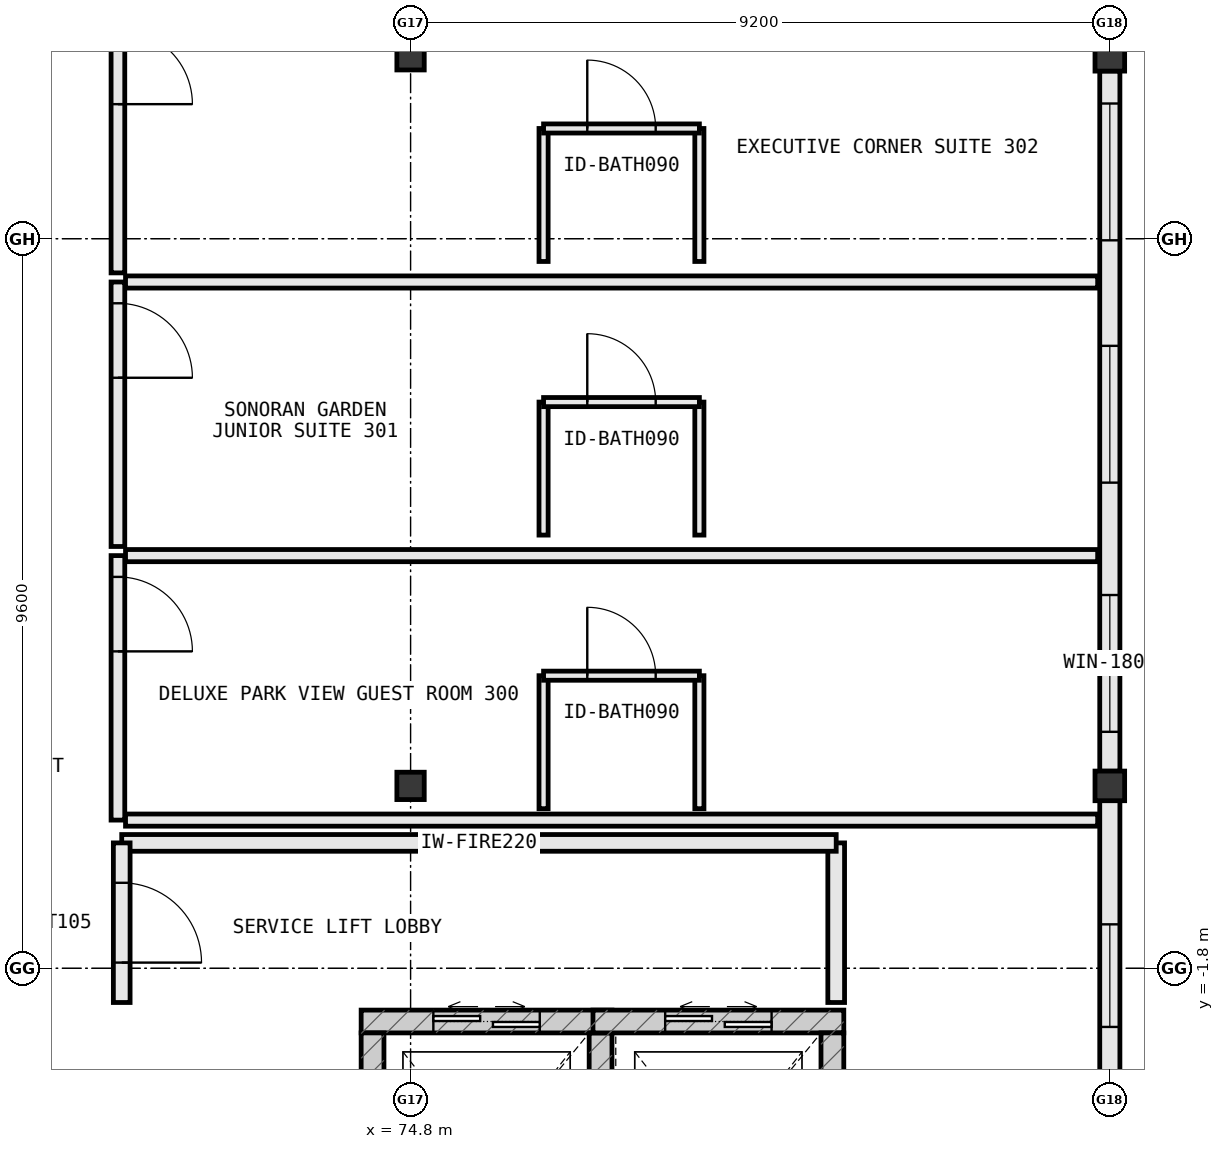
"""IFC4 building model, lengths in metres.
Left out: names, types, materials, properties, quantities, classifications, styles, units other than length and angle.
Written with IfcOpenShell. Run it as: python <this file> out.ifc"""

import sys

from ifc_helpers import new_model, si_unit, direction, frame, frame_2d, origin, origin_2d, place, context, subcontext, project, spatial, rectangle, extrude, element, fill, save


model = new_model("IFC4")
c1 = context("Model", 3, precision=1e-05, world=origin(), true_north=direction((0.0, 1.0)))
c2 = subcontext(c1, "Body", "Model", "MODEL_VIEW")
j1 = project(units=[si_unit("LENGTHUNIT", "METRE"), si_unit("PLANEANGLEUNIT", "RADIAN")], contexts=[c1])
p1 = place(None, origin())
s1 = spatial("IfcSite", under=j1, at=p1, CompositionType="ELEMENT")
p2 = place(p1, origin())
s2 = spatial("IfcBuilding", under=s1, at=p2, CompositionType="ELEMENT")
p3 = place(p2, frame((0.0, 0.0, 46.6)))
s3 = spatial("IfcBuildingStorey", under=s2, at=p3, CompositionType="ELEMENT", Elevation=46.6)
for number, where, z_axis, x_axis in (
    (1, (74.8, 0.6, 0.0), (0.0, 0.0, 1.0), (1.0, 0.0, 0.0)),
    (2, (74.8, 10.2, 0.0), (0.0, 0.0, 1.0), (1.0, 0.0, 0.0)),
):
    element("IfcColumn", number, at=place(p3, frame(where, z_axis=z_axis, x_axis=x_axis)), inside=s3, PredefinedType="COLUMN", context=c2, shape_type="SweptSolid", body=[
        extrude(rectangle(XDim=0.36, YDim=0.36, at=origin_2d()), origin(), (0.0, 0.0, 1.0), 4.2),
    ])
for number, where, z_axis, x_axis in (
    (3, (84.0, 0.6, 0.0), (0.0, 0.0, 1.0), (1.0, 0.0, 0.0)),
    (4, (84.0, 10.2, 0.0), (0.0, 0.0, 1.0), (1.0, 0.0, 0.0)),
):
    element("IfcColumn", number, at=place(p3, frame(where, z_axis=z_axis, x_axis=x_axis)), inside=s3, PredefinedType="COLUMN", context=c2, shape_type="SweptSolid", body=[
        extrude(rectangle(XDim=0.39, YDim=0.39, at=origin_2d()), origin(), (0.0, 0.0, 1.0), 4.2),
    ])
p4 = place(p3, frame((84.0, -8.807, 0.0), z_axis=(0.0, 0.0, 1.0), x_axis=(0.0, 1.0, 0.0)))
e5 = element("IfcWall", 5, at=p4, inside=s3, PredefinedType="STANDARD", context=c2, shape_type="SweptSolid", body=[
    extrude(rectangle(XDim=9.214, YDim=0.265, at=frame_2d((4.607, 0.0))), origin(), (0.0, 0.0, 1.0), 3.99),
])
p5 = place(p4, frame((1.628, 0.0, 0.85)))
e6 = element("IfcOpeningElement", 6, at=p5, cuts=e5, PredefinedType="OPENING", context=c2, shape_type="SweptSolid", body=[
    extrude(rectangle(XDim=1.35, YDim=1.65, at=frame_2d((0.675, 0.825))), frame((0.0, 0.145, 0.0), z_axis=(0.0, -1.0, 0.0), x_axis=(1.0, 0.0, 0.0)), (0.0, 0.0, 1.0), 0.289),
])
p6 = place(p4, frame((6.236, 0.0, 0.85)))
e7 = element("IfcOpeningElement", 7, at=p6, cuts=e5, PredefinedType="OPENING", context=c2, shape_type="SweptSolid", body=[
    extrude(rectangle(XDim=1.35, YDim=1.65, at=frame_2d((0.675, 0.825))), frame((0.0, 0.145, 0.0), z_axis=(0.0, -1.0, 0.0), x_axis=(1.0, 0.0, 0.0)), (0.0, 0.0, 1.0), 0.289),
])
p7 = place(p3, frame((84.0, 0.793, 0.0), z_axis=(0.0, 0.0, 1.0), x_axis=(0.0, 1.0, 0.0)))
e8 = element("IfcWall", 8, at=p7, inside=s3, PredefinedType="STANDARD", context=c2, shape_type="SweptSolid", body=[
    extrude(rectangle(XDim=9.214, YDim=0.265, at=frame_2d((4.607, 0.0))), origin(), (0.0, 0.0, 1.0), 3.99),
])
p8 = place(p7, frame((0.519, 0.0, 0.85)))
e9 = element("IfcOpeningElement", 9, at=p8, cuts=e8, PredefinedType="OPENING", context=c2, shape_type="SweptSolid", body=[
    extrude(rectangle(XDim=1.8, YDim=1.85, at=frame_2d((0.9, 0.925))), frame((0.0, 0.145, 0.0), z_axis=(0.0, -1.0, 0.0), x_axis=(1.0, 0.0, 0.0)), (0.0, 0.0, 1.0), 0.289),
])
p9 = place(p7, frame((3.797, 0.0, 0.85)))
e10 = element("IfcOpeningElement", 10, at=p9, cuts=e8, PredefinedType="OPENING", context=c2, shape_type="SweptSolid", body=[
    extrude(rectangle(XDim=1.8, YDim=1.85, at=frame_2d((0.9, 0.925))), frame((0.0, 0.145, 0.0), z_axis=(0.0, -1.0, 0.0), x_axis=(1.0, 0.0, 0.0)), (0.0, 0.0, 1.0), 0.289),
])
p10 = place(p7, frame((6.986, 0.0, 0.85)))
e11 = element("IfcOpeningElement", 11, at=p10, cuts=e8, PredefinedType="OPENING", context=c2, shape_type="SweptSolid", body=[
    extrude(rectangle(XDim=1.8, YDim=1.85, at=frame_2d((0.9, 0.925))), frame((0.0, 0.145, 0.0), z_axis=(0.0, -1.0, 0.0), x_axis=(1.0, 0.0, 0.0)), (0.0, 0.0, 1.0), 0.289),
])
p11 = place(p3, frame((77.45, -2.5, 0.0), z_axis=(0.0, 0.0, 1.0), x_axis=(-1.0, 0.0, 0.0)))
e12 = element("IfcWall", 12, at=p11, inside=s3, PredefinedType="SHEAR", context=c2, shape_type="SweptSolid", body=[
    extrude(rectangle(XDim=3.3, YDim=0.3, at=frame_2d((1.65, 0.0))), origin(), (0.0, 0.0, 1.0), 3.99),
])
p12 = place(p11, frame((0.95, 0.0, 0.0)))
e13 = element("IfcOpeningElement", 13, at=p12, cuts=e12, PredefinedType="OPENING", context=c2, shape_type="SweptSolid", body=[
    extrude(rectangle(XDim=1.4, YDim=2.2, at=frame_2d((0.7, 1.1))), frame((0.0, 0.162, 0.0), z_axis=(0.0, -1.0, 0.0), x_axis=(1.0, 0.0, 0.0)), (0.0, 0.0, 1.0), 0.324),
])
for number, where, z_axis, x_axis in (
    (14, (77.3, -5.95, 0.0), (0.0, 0.0, 1.0), (0.0, 1.0, 0.0)),
    (15, (74.3, -2.65, 0.0), (0.0, 0.0, 1.0), (0.0, -1.0, 0.0)),
):
    element("IfcWall", number, at=place(p3, frame(where, z_axis=z_axis, x_axis=x_axis)), inside=s3, PredefinedType="SHEAR", context=c2, shape_type="SweptSolid", body=[
        extrude(rectangle(XDim=3.3, YDim=0.3, at=frame_2d((1.65, 0.0))), origin(), (0.0, 0.0, 1.0), 3.99),
    ])
p13 = place(p3, frame((80.5, -2.5, 0.0), z_axis=(0.0, 0.0, 1.0), x_axis=(-1.0, 0.0, 0.0)))
e16 = element("IfcWall", 16, at=p13, inside=s3, PredefinedType="SHEAR", context=c2, shape_type="SweptSolid", body=[
    extrude(rectangle(XDim=3.3, YDim=0.3, at=frame_2d((1.65, 0.0))), origin(), (0.0, 0.0, 1.0), 3.99),
])
p14 = place(p13, frame((0.95, 0.0, 0.0)))
e17 = element("IfcOpeningElement", 17, at=p14, cuts=e16, PredefinedType="OPENING", context=c2, shape_type="SweptSolid", body=[
    extrude(rectangle(XDim=1.4, YDim=2.2, at=frame_2d((0.7, 1.1))), frame((0.0, 0.162, 0.0), z_axis=(0.0, -1.0, 0.0), x_axis=(1.0, 0.0, 0.0)), (0.0, 0.0, 1.0), 0.324),
])
p15 = place(p3, frame((80.35, -5.95, 0.0), z_axis=(0.0, 0.0, 1.0), x_axis=(0.0, 1.0, 0.0)))
e18 = element("IfcWall", 18, at=p15, inside=s3, PredefinedType="SHEAR", context=c2, shape_type="SweptSolid", body=[
    extrude(rectangle(XDim=3.3, YDim=0.3, at=frame_2d((1.65, 0.0))), origin(), (0.0, 0.0, 1.0), 3.99),
])
p16 = place(p3, frame((80.4, -2.25, 0.0), z_axis=(0.0, 0.0, 1.0), x_axis=(0.0, 1.0, 0.0)))
e19 = element("IfcWall", 19, at=p16, inside=s3, PredefinedType="STANDARD", context=c2, shape_type="SweptSolid", body=[
    extrude(rectangle(XDim=2.1, YDim=0.22, at=frame_2d((1.05, 0.0))), origin(), (0.0, 0.0, 1.0), 3.99),
])
p17 = place(p3, frame((80.4, -0.15, 0.0), z_axis=(0.0, 0.0, 1.0), x_axis=(-1.0, 0.0, 0.0)))
e20 = element("IfcWall", 20, at=p17, inside=s3, PredefinedType="STANDARD", context=c2, shape_type="SweptSolid", body=[
    extrude(rectangle(XDim=9.4, YDim=0.22, at=frame_2d((4.7, 0.0))), origin(), (0.0, 0.0, 1.0), 3.99),
])
p18 = place(p3, frame((71.0, -0.15, 0.0), z_axis=(0.0, 0.0, 1.0), x_axis=(0.0, -1.0, 0.0)))
e21 = element("IfcWall", 21, at=p18, inside=s3, PredefinedType="STANDARD", context=c2, shape_type="SweptSolid", body=[
    extrude(rectangle(XDim=2.1, YDim=0.22, at=frame_2d((1.05, 0.0))), origin(), (0.0, 0.0, 1.0), 3.99),
])
p19 = place(p18, frame((0.525, 0.0, 0.0)))
e22 = element("IfcOpeningElement", 22, at=p19, cuts=e21, PredefinedType="OPENING", context=c2, shape_type="SweptSolid", body=[
    extrude(rectangle(XDim=1.05, YDim=2.2, at=frame_2d((0.525, 1.1))), frame((0.0, 0.122, 0.0), z_axis=(0.0, -1.0, 0.0), x_axis=(1.0, 0.0, 0.0)), (0.0, 0.0, 1.0), 0.244),
])
p20 = place(p3, frame((70.95, 3.63, 0.0), z_axis=(0.0, 0.0, 1.0), x_axis=(0.0, -1.0, 0.0)))
e23 = element("IfcWall", 23, at=p20, inside=s3, PredefinedType="PARTITIONING", context=c2, shape_type="SweptSolid", body=[
    extrude(rectangle(XDim=3.48, YDim=0.18, at=frame_2d((1.74, 0.0))), origin(), (0.0, 0.0, 1.0), 3.99),
])
p21 = place(p20, frame((0.28, 0.0, 0.0)))
e24 = element("IfcOpeningElement", 24, at=p21, cuts=e23, PredefinedType="OPENING", context=c2, shape_type="SweptSolid", body=[
    extrude(rectangle(XDim=0.98, YDim=2.18, at=frame_2d((0.49, 1.09))), frame((0.0, 0.102, 0.0), z_axis=(0.0, -1.0, 0.0), x_axis=(1.0, 0.0, 0.0)), (0.0, 0.0, 1.0), 0.204),
])
for number, where, z_axis, x_axis in (
    (25, (71.05, 0.15, 0.0), (0.0, 0.0, 1.0), (1.0, 0.0, 0.0)),
    (26, (71.05, 3.63, 0.0), (0.0, 0.0, 1.0), (1.0, 0.0, 0.0)),
):
    element("IfcWall", number, at=place(p3, frame(where, z_axis=z_axis, x_axis=x_axis)), inside=s3, PredefinedType="PARTITIONING", context=c2, shape_type="SweptSolid", body=[
        extrude(rectangle(XDim=12.79, YDim=0.16, at=frame_2d((6.395, 0.0))), origin(), (0.0, 0.0, 1.0), 3.99),
    ])
for number, where, z_axis, x_axis in (
    (27, (76.55, 0.3, 0.0), (0.0, 0.0, 1.0), (0.0, 1.0, 0.0)),
    (28, (78.6, 0.3, 0.0), (0.0, 0.0, 1.0), (0.0, 1.0, 0.0)),
):
    element("IfcWall", number, at=place(p3, frame(where, z_axis=z_axis, x_axis=x_axis)), inside=s3, PredefinedType="PARTITIONING", context=c2, shape_type="SweptSolid", body=[
        extrude(rectangle(XDim=1.75, YDim=0.12, at=frame_2d((0.875, 0.0))), origin(), (0.0, 0.0, 1.0), 3.99),
    ])
p22 = place(p3, frame((76.55, 2.05, 0.0), z_axis=(0.0, 0.0, 1.0), x_axis=(1.0, 0.0, 0.0)))
e29 = element("IfcWall", 29, at=p22, inside=s3, PredefinedType="PARTITIONING", context=c2, shape_type="SweptSolid", body=[
    extrude(rectangle(XDim=2.05, YDim=0.12, at=frame_2d((1.025, 0.0))), origin(), (0.0, 0.0, 1.0), 3.99),
])
p23 = place(p22, frame((0.575, 0.0, 0.0)))
e30 = element("IfcOpeningElement", 30, at=p23, cuts=e29, PredefinedType="OPENING", context=c2, shape_type="SweptSolid", body=[
    extrude(rectangle(XDim=0.9, YDim=2.15, at=frame_2d((0.45, 1.075))), frame((0.0, 0.072, 0.0), z_axis=(0.0, -1.0, 0.0), x_axis=(1.0, 0.0, 0.0)), (0.0, 0.0, 1.0), 0.144),
])
p24 = place(p3, frame((70.95, 7.23, 0.0), z_axis=(0.0, 0.0, 1.0), x_axis=(0.0, -1.0, 0.0)))
e31 = element("IfcWall", 31, at=p24, inside=s3, PredefinedType="PARTITIONING", context=c2, shape_type="SweptSolid", body=[
    extrude(rectangle(XDim=3.48, YDim=0.18, at=frame_2d((1.74, 0.0))), origin(), (0.0, 0.0, 1.0), 3.99),
])
p25 = place(p24, frame((0.28, 0.0, 0.0)))
e32 = element("IfcOpeningElement", 32, at=p25, cuts=e31, PredefinedType="OPENING", context=c2, shape_type="SweptSolid", body=[
    extrude(rectangle(XDim=0.98, YDim=2.18, at=frame_2d((0.49, 1.09))), frame((0.0, 0.102, 0.0), z_axis=(0.0, -1.0, 0.0), x_axis=(1.0, 0.0, 0.0)), (0.0, 0.0, 1.0), 0.204),
])
p26 = place(p3, frame((71.05, 7.23, 0.0), z_axis=(0.0, 0.0, 1.0), x_axis=(1.0, 0.0, 0.0)))
e33 = element("IfcWall", 33, at=p26, inside=s3, PredefinedType="PARTITIONING", context=c2, shape_type="SweptSolid", body=[
    extrude(rectangle(XDim=12.79, YDim=0.16, at=frame_2d((6.395, 0.0))), origin(), (0.0, 0.0, 1.0), 3.99),
])
for number, where, z_axis, x_axis in (
    (34, (76.55, 3.9, 0.0), (0.0, 0.0, 1.0), (0.0, 1.0, 0.0)),
    (35, (78.6, 3.9, 0.0), (0.0, 0.0, 1.0), (0.0, 1.0, 0.0)),
):
    element("IfcWall", number, at=place(p3, frame(where, z_axis=z_axis, x_axis=x_axis)), inside=s3, PredefinedType="PARTITIONING", context=c2, shape_type="SweptSolid", body=[
        extrude(rectangle(XDim=1.75, YDim=0.12, at=frame_2d((0.875, 0.0))), origin(), (0.0, 0.0, 1.0), 3.99),
    ])
p27 = place(p3, frame((76.55, 5.65, 0.0), z_axis=(0.0, 0.0, 1.0), x_axis=(1.0, 0.0, 0.0)))
e36 = element("IfcWall", 36, at=p27, inside=s3, PredefinedType="PARTITIONING", context=c2, shape_type="SweptSolid", body=[
    extrude(rectangle(XDim=2.05, YDim=0.12, at=frame_2d((1.025, 0.0))), origin(), (0.0, 0.0, 1.0), 3.99),
])
p28 = place(p27, frame((0.575, 0.0, 0.0)))
e37 = element("IfcOpeningElement", 37, at=p28, cuts=e36, PredefinedType="OPENING", context=c2, shape_type="SweptSolid", body=[
    extrude(rectangle(XDim=0.9, YDim=2.15, at=frame_2d((0.45, 1.075))), frame((0.0, 0.072, 0.0), z_axis=(0.0, -1.0, 0.0), x_axis=(1.0, 0.0, 0.0)), (0.0, 0.0, 1.0), 0.144),
])
p29 = place(p3, frame((70.95, 10.83, 0.0), z_axis=(0.0, 0.0, 1.0), x_axis=(0.0, -1.0, 0.0)))
e38 = element("IfcWall", 38, at=p29, inside=s3, PredefinedType="PARTITIONING", context=c2, shape_type="SweptSolid", body=[
    extrude(rectangle(XDim=3.48, YDim=0.18, at=frame_2d((1.74, 0.0))), origin(), (0.0, 0.0, 1.0), 3.99),
])
p30 = place(p29, frame((0.28, 0.0, 0.0)))
e39 = element("IfcOpeningElement", 39, at=p30, cuts=e38, PredefinedType="OPENING", context=c2, shape_type="SweptSolid", body=[
    extrude(rectangle(XDim=0.98, YDim=2.18, at=frame_2d((0.49, 1.09))), frame((0.0, 0.102, 0.0), z_axis=(0.0, -1.0, 0.0), x_axis=(1.0, 0.0, 0.0)), (0.0, 0.0, 1.0), 0.204),
])
for number, where, z_axis, x_axis in (
    (40, (76.55, 7.5, 0.0), (0.0, 0.0, 1.0), (0.0, 1.0, 0.0)),
    (41, (78.6, 7.5, 0.0), (0.0, 0.0, 1.0), (0.0, 1.0, 0.0)),
):
    element("IfcWall", number, at=place(p3, frame(where, z_axis=z_axis, x_axis=x_axis)), inside=s3, PredefinedType="PARTITIONING", context=c2, shape_type="SweptSolid", body=[
        extrude(rectangle(XDim=1.75, YDim=0.12, at=frame_2d((0.875, 0.0))), origin(), (0.0, 0.0, 1.0), 3.99),
    ])
p31 = place(p3, frame((76.55, 9.25, 0.0), z_axis=(0.0, 0.0, 1.0), x_axis=(1.0, 0.0, 0.0)))
e42 = element("IfcWall", 42, at=p31, inside=s3, PredefinedType="PARTITIONING", context=c2, shape_type="SweptSolid", body=[
    extrude(rectangle(XDim=2.05, YDim=0.12, at=frame_2d((1.025, 0.0))), origin(), (0.0, 0.0, 1.0), 3.99),
])
p32 = place(p31, frame((0.575, 0.0, 0.0)))
e43 = element("IfcOpeningElement", 43, at=p32, cuts=e42, PredefinedType="OPENING", context=c2, shape_type="SweptSolid", body=[
    extrude(rectangle(XDim=0.9, YDim=2.15, at=frame_2d((0.45, 1.075))), frame((0.0, 0.072, 0.0), z_axis=(0.0, -1.0, 0.0), x_axis=(1.0, 0.0, 0.0)), (0.0, 0.0, 1.0), 0.144),
])
p33 = place(p6, origin())
e44 = element("IfcWindow", 44, at=p33, inside=s3, PartitioningType="SINGLE_PANEL", PredefinedType="WINDOW", context=c2, shape_type="SweptSolid", body=[
    extrude(rectangle(XDim=1.35, YDim=1.65, at=frame_2d((0.675, 0.825))), frame((0.0, 0.03, 0.0), z_axis=(0.0, -1.0, 0.0), x_axis=(1.0, 0.0, 0.0)), (0.0, 0.0, 1.0), 0.06),
])
fill(e7, e44)
p34 = place(p8, origin())
e45 = element("IfcWindow", 45, at=p34, inside=s3, PartitioningType="SINGLE_PANEL", PredefinedType="WINDOW", context=c2, shape_type="SweptSolid", body=[
    extrude(rectangle(XDim=1.8, YDim=1.85, at=frame_2d((0.9, 0.925))), frame((0.0, 0.03, 0.0), z_axis=(0.0, -1.0, 0.0), x_axis=(1.0, 0.0, 0.0)), (0.0, 0.0, 1.0), 0.06),
])
fill(e9, e45)
p35 = place(p9, origin())
e46 = element("IfcWindow", 46, at=p35, inside=s3, PartitioningType="SINGLE_PANEL", PredefinedType="WINDOW", context=c2, shape_type="SweptSolid", body=[
    extrude(rectangle(XDim=1.8, YDim=1.85, at=frame_2d((0.9, 0.925))), frame((0.0, 0.03, 0.0), z_axis=(0.0, -1.0, 0.0), x_axis=(1.0, 0.0, 0.0)), (0.0, 0.0, 1.0), 0.06),
])
fill(e10, e46)
p36 = place(p10, origin())
e47 = element("IfcWindow", 47, at=p36, inside=s3, PartitioningType="SINGLE_PANEL", PredefinedType="WINDOW", context=c2, shape_type="SweptSolid", body=[
    extrude(rectangle(XDim=1.8, YDim=1.85, at=frame_2d((0.9, 0.925))), frame((0.0, 0.03, 0.0), z_axis=(0.0, -1.0, 0.0), x_axis=(1.0, 0.0, 0.0)), (0.0, 0.0, 1.0), 0.06),
])
fill(e11, e47)
p37 = place(p12, origin())
e48 = element("IfcDoor", 48, at=p37, inside=s3, OperationType="DOUBLE_DOOR_SLIDING", PredefinedType="DOOR", context=c2, shape_type="SweptSolid", body=[
    extrude(rectangle(XDim=1.4, YDim=2.2, at=frame_2d((0.7, 1.1))), frame((0.0, 0.025, 0.0), z_axis=(0.0, -1.0, 0.0), x_axis=(1.0, 0.0, 0.0)), (0.0, 0.0, 1.0), 0.05),
])
fill(e13, e48)
p38 = place(p14, origin())
e49 = element("IfcDoor", 49, at=p38, inside=s3, OperationType="DOUBLE_DOOR_SLIDING", PredefinedType="DOOR", context=c2, shape_type="SweptSolid", body=[
    extrude(rectangle(XDim=1.4, YDim=2.2, at=frame_2d((0.7, 1.1))), frame((0.0, 0.025, 0.0), z_axis=(0.0, -1.0, 0.0), x_axis=(1.0, 0.0, 0.0)), (0.0, 0.0, 1.0), 0.05),
])
fill(e17, e49)
p39 = place(p19, origin())
e50 = element("IfcDoor", 50, at=p39, inside=s3, OperationType="SINGLE_SWING_RIGHT", PredefinedType="DOOR", context=c2, shape_type="SweptSolid", body=[
    extrude(rectangle(XDim=1.05, YDim=2.2, at=frame_2d((0.525, 1.1))), frame((0.0, 0.025, 0.0), z_axis=(0.0, -1.0, 0.0), x_axis=(1.0, 0.0, 0.0)), (0.0, 0.0, 1.0), 0.05),
])
fill(e22, e50)
p40 = place(p21, origin())
e51 = element("IfcDoor", 51, at=p40, inside=s3, OperationType="SINGLE_SWING_RIGHT", PredefinedType="DOOR", context=c2, shape_type="SweptSolid", body=[
    extrude(rectangle(XDim=0.98, YDim=2.18, at=frame_2d((0.49, 1.09))), frame((0.0, 0.025, 0.0), z_axis=(0.0, -1.0, 0.0), x_axis=(1.0, 0.0, 0.0)), (0.0, 0.0, 1.0), 0.05),
])
fill(e24, e51)
p41 = place(p23, origin())
e52 = element("IfcDoor", 52, at=p41, inside=s3, OperationType="SINGLE_SWING_LEFT", PredefinedType="DOOR", context=c2, shape_type="SweptSolid", body=[
    extrude(rectangle(XDim=0.9, YDim=2.15, at=frame_2d((0.45, 1.075))), frame((0.0, 0.025, 0.0), z_axis=(0.0, -1.0, 0.0), x_axis=(1.0, 0.0, 0.0)), (0.0, 0.0, 1.0), 0.05),
])
fill(e30, e52)
p42 = place(p25, origin())
e53 = element("IfcDoor", 53, at=p42, inside=s3, OperationType="SINGLE_SWING_RIGHT", PredefinedType="DOOR", context=c2, shape_type="SweptSolid", body=[
    extrude(rectangle(XDim=0.98, YDim=2.18, at=frame_2d((0.49, 1.09))), frame((0.0, 0.025, 0.0), z_axis=(0.0, -1.0, 0.0), x_axis=(1.0, 0.0, 0.0)), (0.0, 0.0, 1.0), 0.05),
])
fill(e32, e53)
p43 = place(p28, origin())
e54 = element("IfcDoor", 54, at=p43, inside=s3, OperationType="SINGLE_SWING_LEFT", PredefinedType="DOOR", context=c2, shape_type="SweptSolid", body=[
    extrude(rectangle(XDim=0.9, YDim=2.15, at=frame_2d((0.45, 1.075))), frame((0.0, 0.025, 0.0), z_axis=(0.0, -1.0, 0.0), x_axis=(1.0, 0.0, 0.0)), (0.0, 0.0, 1.0), 0.05),
])
fill(e37, e54)
p44 = place(p30, origin())
e55 = element("IfcDoor", 55, at=p44, inside=s3, OperationType="SINGLE_SWING_RIGHT", PredefinedType="DOOR", context=c2, shape_type="SweptSolid", body=[
    extrude(rectangle(XDim=0.98, YDim=2.18, at=frame_2d((0.49, 1.09))), frame((0.0, 0.025, 0.0), z_axis=(0.0, -1.0, 0.0), x_axis=(1.0, 0.0, 0.0)), (0.0, 0.0, 1.0), 0.05),
])
fill(e39, e55)
p45 = place(p32, origin())
e56 = element("IfcDoor", 56, at=p45, inside=s3, OperationType="SINGLE_SWING_LEFT", PredefinedType="DOOR", context=c2, shape_type="SweptSolid", body=[
    extrude(rectangle(XDim=0.9, YDim=2.15, at=frame_2d((0.45, 1.075))), frame((0.0, 0.025, 0.0), z_axis=(0.0, -1.0, 0.0), x_axis=(1.0, 0.0, 0.0)), (0.0, 0.0, 1.0), 0.05),
])
fill(e43, e56)
save(model, sys.argv[1])
